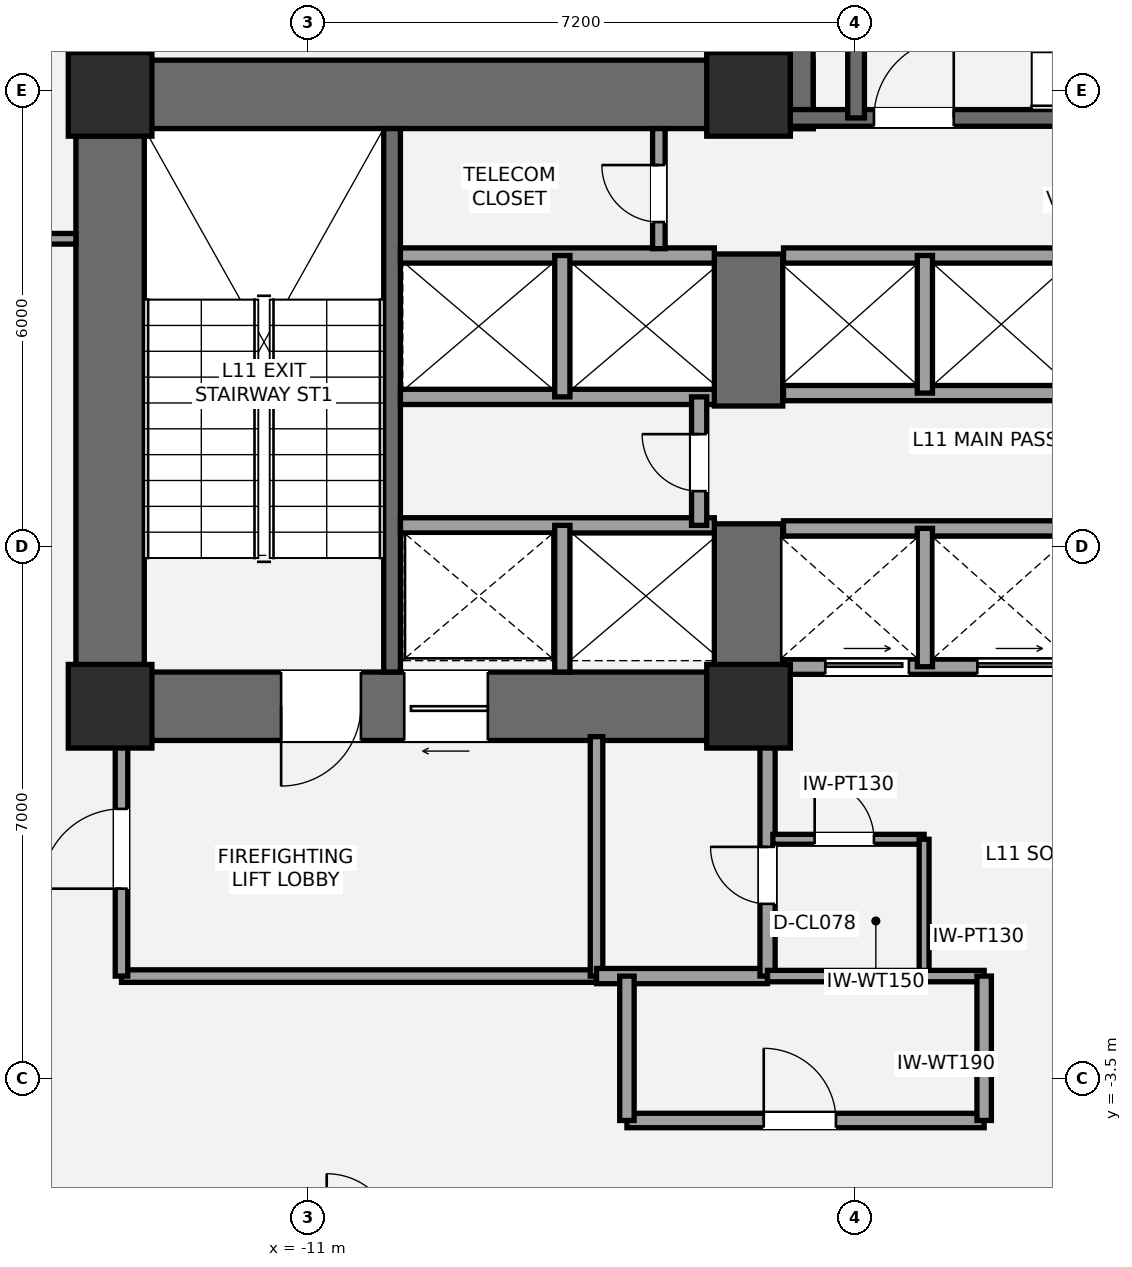
"""IFC4 building model, lengths in metres.
Left out: names, types, materials, properties, quantities, classifications, styles, units other than length and angle.
Written with IfcOpenShell. Run it as: python <this file> out.ifc"""

import sys

from ifc_helpers import new_model, si_unit, direction, frame, frame_2d, origin, origin_2d, place, context, subcontext, project, spatial, rectangle, extrude, element, fill, save


model = new_model("IFC4")
c1 = context("Model", 3, precision=1e-05, world=origin(), true_north=direction((0.0, 1.0)))
c2 = subcontext(c1, "Body", "Model", "MODEL_VIEW")
j1 = project(units=[si_unit("LENGTHUNIT", "METRE"), si_unit("PLANEANGLEUNIT", "RADIAN")], contexts=[c1])
p1 = place(None, origin())
s1 = spatial("IfcSite", under=j1, at=p1, CompositionType="ELEMENT")
p2 = place(p1, origin())
s2 = spatial("IfcBuilding", under=s1, at=p2, CompositionType="ELEMENT")
p3 = place(p2, frame((0.0, 0.0, 45.0)))
s3 = spatial("IfcBuildingStorey", under=s2, at=p3, CompositionType="ELEMENT", Elevation=45.0)
p4 = place(p3, frame((-13.6, 0.95, 0.0), z_axis=(0.0, 0.0, 1.0), x_axis=(0.0, 1.0, 0.0)))
e1 = element("IfcWall", 1, at=p4, inside=s3, PredefinedType="SHEAR", context=c2, shape_type="SweptSolid", body=[
    extrude(rectangle(XDim=8.95, YDim=0.9, at=frame_2d((4.475, 0.0))), origin(), (0.0, 0.0, 1.0), 3.6),
])
p5 = place(p3, frame((-14.05, 9.45, 0.0), z_axis=(0.0, 0.0, 1.0), x_axis=(1.0, 0.0, 0.0)))
e2 = element("IfcWall", 2, at=p5, inside=s3, PredefinedType="SHEAR", context=c2, shape_type="SweptSolid", body=[
    extrude(rectangle(XDim=9.7, YDim=0.9, at=frame_2d((4.85, 0.0))), origin(), (0.0, 0.0, 1.0), 3.6),
])
p6 = place(p3, frame((-4.75, 1.4, 0.0), z_axis=(0.0, 0.0, 1.0), x_axis=(-1.0, 0.0, 0.0)))
e3 = element("IfcWall", 3, at=p6, inside=s3, PredefinedType="SHEAR", context=c2, shape_type="SweptSolid", body=[
    extrude(rectangle(XDim=9.3, YDim=0.9, at=frame_2d((4.65, 0.0))), origin(), (0.0, 0.0, 1.0), 3.6),
])
p7 = place(p6, frame((5.55, 0.0, 0.0)))
e4 = element("IfcOpeningElement", 4, at=p7, cuts=e3, PredefinedType="OPENING", context=c2, shape_type="SweptSolid", body=[
    extrude(rectangle(XDim=1.05, YDim=2.15, at=frame_2d((0.525, 1.075))), frame((0.0, 0.46, 0.0), z_axis=(0.0, -1.0, 0.0), x_axis=(1.0, 0.0, 0.0)), (0.0, 0.0, 1.0), 0.92),
])
p8 = place(p6, frame((3.88, 0.0, 0.0)))
e5 = element("IfcOpeningElement", 5, at=p8, cuts=e3, PredefinedType="OPENING", context=c2, shape_type="SweptSolid", body=[
    extrude(rectangle(XDim=1.1, YDim=2.2, at=frame_2d((0.55, 1.1))), frame((0.0, 0.46, 0.0), z_axis=(0.0, -1.0, 0.0), x_axis=(1.0, 0.0, 0.0)), (0.0, 0.0, 1.0), 0.92),
])
p9 = place(p3, frame((-5.2, 0.95, 0.0), z_axis=(0.0, 0.0, 1.0), x_axis=(0.0, 1.0, 0.0)))
e6 = element("IfcWall", 6, at=p9, inside=s3, PredefinedType="SHEAR", context=c2, shape_type="SweptSolid", body=[
    extrude(rectangle(XDim=2.85, YDim=0.9, at=frame_2d((1.425, 0.0))), origin(), (0.0, 0.0, 1.0), 3.6),
])
p10 = place(p3, frame((-5.2, 5.35, 0.0), z_axis=(0.0, 0.0, 1.0), x_axis=(0.0, 1.0, 0.0)))
e7 = element("IfcWall", 7, at=p10, inside=s3, PredefinedType="SHEAR", context=c2, shape_type="SweptSolid", body=[
    extrude(rectangle(XDim=2.0, YDim=0.9, at=frame_2d((1.0, 0.0))), origin(), (0.0, 0.0, 1.0), 3.6),
])
p11 = place(p3, frame((-9.89, 1.85, 0.0), z_axis=(0.0, 0.0, 1.0), x_axis=(0.0, 1.0, 0.0)))
e8 = element("IfcWall", 8, at=p11, inside=s3, PredefinedType="SHEAR", context=c2, shape_type="SweptSolid", body=[
    extrude(rectangle(XDim=7.15, YDim=0.22, at=frame_2d((3.575, 0.0))), origin(), (0.0, 0.0, 1.0), 3.6),
])
p12 = place(p3, frame((-4.8, 9.0, 0.0), z_axis=(0.0, 0.0, 1.0), x_axis=(0.0, 1.0, 0.0)))
e9 = element("IfcWall", 9, at=p12, inside=s3, PredefinedType="SHEAR", context=c2, shape_type="SweptSolid", body=[
    extrude(rectangle(XDim=4.3, YDim=0.9, at=frame_2d((2.15, 0.0))), origin(), (0.0, 0.0, 1.0), 3.6),
])
p13 = place(p3, frame((-4.7, 9.14, 0.0), z_axis=(0.0, 0.0, 1.0), x_axis=(1.0, 0.0, 0.0)))
e10 = element("IfcWall", 10, at=p13, inside=s3, PredefinedType="SHEAR", context=c2, shape_type="SweptSolid", body=[
    extrude(rectangle(XDim=9.3, YDim=0.22, at=frame_2d((4.65, 0.0))), origin(), (0.0, 0.0, 1.0), 3.6),
])
p14 = place(p13, frame((1.15, 0.0, 0.0)))
e11 = element("IfcOpeningElement", 11, at=p14, cuts=e10, PredefinedType="OPENING", context=c2, shape_type="SweptSolid", body=[
    extrude(rectangle(XDim=1.05, YDim=2.15, at=frame_2d((0.525, 1.075))), frame((0.0, 0.12, 0.0), z_axis=(0.0, -1.0, 0.0), x_axis=(1.0, 0.0, 0.0)), (0.0, 0.0, 1.0), 0.24),
])
p15 = place(p3, frame((-3.785, 9.14, 0.0), z_axis=(0.0, 0.0, 1.0), x_axis=(0.0, 1.0, 0.0)))
e12 = element("IfcWall", 12, at=p15, inside=s3, PredefinedType="SHEAR", context=c2, shape_type="SweptSolid", body=[
    extrude(rectangle(XDim=3.26, YDim=0.22, at=frame_2d((1.63, 0.0))), origin(), (0.0, 0.0, 1.0), 3.6),
])
for number, where, z_axis, x_axis in (
    (13, (-13.6, 1.4, 0.0), (0.0, 0.0, 1.0), (1.0, 0.0, 0.0)),
    (14, (-13.6, 9.45, 0.0), (0.0, 0.0, 1.0), (1.0, 0.0, 0.0)),
    (15, (-5.2, 1.4, 0.0), (0.0, 0.0, 1.0), (1.0, 0.0, 0.0)),
    (16, (-5.2, 9.45, 0.0), (0.0, 0.0, 1.0), (1.0, 0.0, 0.0)),
):
    element("IfcColumn", number, at=place(p3, frame(where, z_axis=z_axis, x_axis=x_axis)), inside=s3, PredefinedType="COLUMN", context=c2, shape_type="SweptSolid", body=[
        extrude(rectangle(XDim=1.1, YDim=1.1, at=origin_2d()), origin(), (0.0, 0.0, 1.0), 3.6),
    ])
p16 = place(p3, frame((-13.45, -2.15, 0.0), z_axis=(0.0, 0.0, 1.0), x_axis=(1.0, 0.0, 0.0)))
e17 = element("IfcWall", 17, at=p16, inside=s3, PredefinedType="PARTITIONING", context=c2, shape_type="SweptSolid", body=[
    extrude(rectangle(XDim=6.25, YDim=0.165, at=frame_2d((3.125, 0.0))), origin(), (0.0, 0.0, 1.0), 2.853),
])
p17 = place(p3, frame((-13.45, -2.15, 0.0), z_axis=(0.0, 0.0, 1.0), x_axis=(0.0, 1.0, 0.0)))
e18 = element("IfcWall", 18, at=p17, inside=s3, PredefinedType="PARTITIONING", context=c2, shape_type="SweptSolid", body=[
    extrude(rectangle(XDim=3.15, YDim=0.165, at=frame_2d((1.575, 0.0))), origin(), (0.0, 0.0, 1.0), 2.853),
])
p18 = place(p17, frame((1.15, 0.0, 0.0)))
e19 = element("IfcOpeningElement", 19, at=p18, cuts=e18, PredefinedType="OPENING", context=c2, shape_type="SweptSolid", body=[
    extrude(rectangle(XDim=1.05, YDim=2.15, at=frame_2d((0.525, 1.075))), frame((0.0, 0.093, 0.0), z_axis=(0.0, -1.0, 0.0), x_axis=(1.0, 0.0, 0.0)), (0.0, 0.0, 1.0), 0.185),
])
p19 = place(p3, frame((-7.2, -2.15, 0.0), z_axis=(0.0, 0.0, 1.0), x_axis=(0.0, 1.0, 0.0)))
e20 = element("IfcWall", 20, at=p19, inside=s3, PredefinedType="PARTITIONING", context=c2, shape_type="SweptSolid", body=[
    extrude(rectangle(XDim=3.15, YDim=0.165, at=frame_2d((1.575, 0.0))), origin(), (0.0, 0.0, 1.0), 2.853),
])
p20 = place(p3, frame((-7.2, -2.15, 0.0), z_axis=(0.0, 0.0, 1.0), x_axis=(1.0, 0.0, 0.0)))
e21 = element("IfcWall", 21, at=p20, inside=s3, PredefinedType="SOLIDWALL", context=c2, shape_type="SweptSolid", body=[
    extrude(rectangle(XDim=2.25, YDim=0.2, at=frame_2d((1.125, 0.0))), origin(), (0.0, 0.0, 1.0), 3.4),
])
p21 = place(p3, frame((-4.95, -2.15, 0.0), z_axis=(0.0, 0.0, 1.0), x_axis=(0.0, 1.0, 0.0)))
e22 = element("IfcWall", 22, at=p21, inside=s3, PredefinedType="SOLIDWALL", context=c2, shape_type="SweptSolid", body=[
    extrude(rectangle(XDim=3.15, YDim=0.2, at=frame_2d((1.575, 0.0))), origin(), (0.0, 0.0, 1.0), 2.853),
])
p22 = place(p21, frame((0.95, 0.0, 0.0)))
e23 = element("IfcOpeningElement", 23, at=p22, cuts=e22, PredefinedType="OPENING", context=c2, shape_type="SweptSolid", body=[
    extrude(rectangle(XDim=0.75, YDim=2.1, at=frame_2d((0.375, 1.05))), frame((0.0, 0.11, 0.0), z_axis=(0.0, -1.0, 0.0), x_axis=(1.0, 0.0, 0.0)), (0.0, 0.0, 1.0), 0.22),
])
p23 = place(p3, frame((-4.88, -0.35, 0.0), z_axis=(0.0, 0.0, 1.0), x_axis=(1.0, 0.0, 0.0)))
e24 = element("IfcWall", 24, at=p23, inside=s3, PredefinedType="PARTITIONING", context=c2, shape_type="SweptSolid", body=[
    extrude(rectangle(XDim=1.99, YDim=0.13, at=frame_2d((0.995, 0.0))), origin(), (0.0, 0.0, 1.0), 3.4),
])
p24 = place(p23, frame((0.55, 0.0, 0.0)))
e25 = element("IfcOpeningElement", 25, at=p24, cuts=e24, PredefinedType="OPENING", context=c2, shape_type="SweptSolid", body=[
    extrude(rectangle(XDim=0.78, YDim=2.1, at=frame_2d((0.39, 1.05))), frame((0.0, 0.075, 0.0), z_axis=(0.0, -1.0, 0.0), x_axis=(1.0, 0.0, 0.0)), (0.0, 0.0, 1.0), 0.15),
])
p25 = place(p3, frame((-2.89, -2.15, 0.0), z_axis=(0.0, 0.0, 1.0), x_axis=(0.0, 1.0, 0.0)))
e26 = element("IfcWall", 26, at=p25, inside=s3, PredefinedType="PARTITIONING", context=c2, shape_type="SweptSolid", body=[
    extrude(rectangle(XDim=1.8, YDim=0.13, at=frame_2d((0.9, 0.0))), origin(), (0.0, 0.0, 1.0), 3.4),
])
p26 = place(p3, frame((-9.78, 3.78, 0.0), z_axis=(0.0, 0.0, 1.0), x_axis=(1.0, 0.0, 0.0)))
e27 = element("IfcWall", 27, at=p26, inside=s3, PredefinedType="SOLIDWALL", context=c2, shape_type="SweptSolid", body=[
    extrude(rectangle(XDim=4.13, YDim=0.2, at=frame_2d((2.065, 0.0))), origin(), (0.0, 0.0, 1.0), 3.4),
])
p27 = place(p3, frame((-7.65, 1.85, 0.0), z_axis=(0.0, 0.0, 1.0), x_axis=(0.0, 1.0, 0.0)))
e28 = element("IfcWall", 28, at=p27, inside=s3, PredefinedType="SOLIDWALL", context=c2, shape_type="SweptSolid", body=[
    extrude(rectangle(XDim=1.93, YDim=0.2, at=frame_2d((0.965, 0.0))), origin(), (0.0, 0.0, 1.0), 3.4),
])
for number, where, z_axis, x_axis in (
    (29, (-9.78, 5.47, 0.0), (0.0, 0.0, 1.0), (1.0, 0.0, 0.0)),
    (30, (-9.78, 7.33, 0.0), (0.0, 0.0, 1.0), (1.0, 0.0, 0.0)),
):
    element("IfcWall", number, at=place(p3, frame(where, z_axis=z_axis, x_axis=x_axis)), inside=s3, PredefinedType="SOLIDWALL", context=c2, shape_type="SweptSolid", body=[
        extrude(rectangle(XDim=4.13, YDim=0.2, at=frame_2d((2.065, 0.0))), origin(), (0.0, 0.0, 1.0), 3.4),
    ])
p28 = place(p3, frame((-7.65, 5.47, 0.0), z_axis=(0.0, 0.0, 1.0), x_axis=(0.0, 1.0, 0.0)))
e31 = element("IfcWall", 31, at=p28, inside=s3, PredefinedType="SOLIDWALL", context=c2, shape_type="SweptSolid", body=[
    extrude(rectangle(XDim=1.86, YDim=0.2, at=frame_2d((0.93, 0.0))), origin(), (0.0, 0.0, 1.0), 3.4),
])
p29 = place(p3, frame((-5.85, 3.78, 0.0), z_axis=(0.0, 0.0, 1.0), x_axis=(0.0, 1.0, 0.0)))
e32 = element("IfcWall", 32, at=p29, inside=s3, PredefinedType="SOLIDWALL", context=c2, shape_type="SweptSolid", body=[
    extrude(rectangle(XDim=1.69, YDim=0.2, at=frame_2d((0.845, 0.0))), origin(), (0.0, 0.0, 1.0), 3.4),
])
p30 = place(p29, frame((0.45, 0.0, 0.0)))
e33 = element("IfcOpeningElement", 33, at=p30, cuts=e32, PredefinedType="OPENING", context=c2, shape_type="SweptSolid", body=[
    extrude(rectangle(XDim=0.75, YDim=2.1, at=frame_2d((0.375, 1.05))), frame((0.0, 0.11, 0.0), z_axis=(0.0, -1.0, 0.0), x_axis=(1.0, 0.0, 0.0)), (0.0, 0.0, 1.0), 0.22),
])
p31 = place(p3, frame((-4.74, 1.92, 0.0), z_axis=(0.0, 0.0, 1.0), x_axis=(1.0, 0.0, 0.0)))
e34 = element("IfcWall", 34, at=p31, inside=s3, PredefinedType="SOLIDWALL", context=c2, shape_type="SweptSolid", body=[
    extrude(rectangle(XDim=3.86, YDim=0.2, at=frame_2d((1.93, 0.0))), origin(), (0.0, 0.0, 1.0), 2.39),
])
p32 = place(p31, frame((0.55, 0.0, 0.0)))
e35 = element("IfcOpeningElement", 35, at=p32, cuts=e34, PredefinedType="OPENING", context=c2, shape_type="SweptSolid", body=[
    extrude(rectangle(XDim=1.1, YDim=2.2, at=frame_2d((0.55, 1.1))), frame((0.0, 0.11, 0.0), z_axis=(0.0, -1.0, 0.0), x_axis=(1.0, 0.0, 0.0)), (0.0, 0.0, 1.0), 0.22),
])
p33 = place(p31, frame((2.55, 0.0, 0.0)))
e36 = element("IfcOpeningElement", 36, at=p33, cuts=e34, PredefinedType="OPENING", context=c2, shape_type="SweptSolid", body=[
    extrude(rectangle(XDim=1.1, YDim=2.2, at=frame_2d((0.55, 1.1))), frame((0.0, 0.11, 0.0), z_axis=(0.0, -1.0, 0.0), x_axis=(1.0, 0.0, 0.0)), (0.0, 0.0, 1.0), 0.22),
])
p34 = place(p3, frame((-4.74, 3.74, 0.0), z_axis=(0.0, 0.0, 1.0), x_axis=(1.0, 0.0, 0.0)))
e37 = element("IfcWall", 37, at=p34, inside=s3, PredefinedType="SOLIDWALL", context=c2, shape_type="SweptSolid", body=[
    extrude(rectangle(XDim=3.86, YDim=0.2, at=frame_2d((1.93, 0.0))), origin(), (0.0, 0.0, 1.0), 3.4),
])
p35 = place(p3, frame((-2.88, 1.92, 0.0), z_axis=(0.0, 0.0, 1.0), x_axis=(0.0, 1.0, 0.0)))
e38 = element("IfcWall", 38, at=p35, inside=s3, PredefinedType="SOLIDWALL", context=c2, shape_type="SweptSolid", body=[
    extrude(rectangle(XDim=1.82, YDim=0.2, at=frame_2d((0.91, 0.0))), origin(), (0.0, 0.0, 1.0), 3.4),
])
for number, where, z_axis, x_axis in (
    (39, (-4.74, 5.52, 0.0), (0.0, 0.0, 1.0), (1.0, 0.0, 0.0)),
    (40, (-4.74, 7.33, 0.0), (0.0, 0.0, 1.0), (1.0, 0.0, 0.0)),
):
    element("IfcWall", number, at=place(p3, frame(where, z_axis=z_axis, x_axis=x_axis)), inside=s3, PredefinedType="SOLIDWALL", context=c2, shape_type="SweptSolid", body=[
        extrude(rectangle(XDim=3.86, YDim=0.2, at=frame_2d((1.93, 0.0))), origin(), (0.0, 0.0, 1.0), 3.4),
    ])
p36 = place(p3, frame((-2.88, 5.52, 0.0), z_axis=(0.0, 0.0, 1.0), x_axis=(0.0, 1.0, 0.0)))
e41 = element("IfcWall", 41, at=p36, inside=s3, PredefinedType="SOLIDWALL", context=c2, shape_type="SweptSolid", body=[
    extrude(rectangle(XDim=1.81, YDim=0.2, at=frame_2d((0.905, 0.0))), origin(), (0.0, 0.0, 1.0), 3.4),
])
p37 = place(p3, frame((-6.38, 7.42, 0.0), z_axis=(0.0, 0.0, 1.0), x_axis=(0.0, 1.0, 0.0)))
e42 = element("IfcWall", 42, at=p37, inside=s3, PredefinedType="PARTITIONING", context=c2, shape_type="SweptSolid", body=[
    extrude(rectangle(XDim=1.58, YDim=0.165, at=frame_2d((0.79, 0.0))), origin(), (0.0, 0.0, 1.0), 3.4),
])
p38 = place(p37, frame((0.35, 0.0, 0.0)))
e43 = element("IfcOpeningElement", 43, at=p38, cuts=e42, PredefinedType="OPENING", context=c2, shape_type="SweptSolid", body=[
    extrude(rectangle(XDim=0.75, YDim=2.1, at=frame_2d((0.375, 1.05))), frame((0.0, 0.093, 0.0), z_axis=(0.0, -1.0, 0.0), x_axis=(1.0, 0.0, 0.0)), (0.0, 0.0, 1.0), 0.185),
])
p39 = place(p3, frame((-6.8, -4.05, 0.0), z_axis=(0.0, 0.0, 1.0), x_axis=(1.0, 0.0, 0.0)))
e44 = element("IfcWall", 44, at=p39, inside=s3, PredefinedType="PLUMBINGWALL", context=c2, shape_type="SweptSolid", body=[
    extrude(rectangle(XDim=4.7, YDim=0.19, at=frame_2d((2.35, 0.0))), origin(), (0.0, 0.0, 1.0), 2.853),
])
p40 = place(p39, frame((1.8, 0.0, 0.0)))
e45 = element("IfcOpeningElement", 45, at=p40, cuts=e44, PredefinedType="OPENING", context=c2, shape_type="SweptSolid", body=[
    extrude(rectangle(XDim=0.95, YDim=2.15, at=frame_2d((0.475, 1.075))), frame((0.0, 0.105, 0.0), z_axis=(0.0, -1.0, 0.0), x_axis=(1.0, 0.0, 0.0)), (0.0, 0.0, 1.0), 0.21),
])
p41 = place(p3, frame((-4.95, -2.15, 0.0), z_axis=(0.0, 0.0, 1.0), x_axis=(1.0, 0.0, 0.0)))
e46 = element("IfcWall", 46, at=p41, inside=s3, PredefinedType="PLUMBINGWALL", context=c2, shape_type="SweptSolid", body=[
    extrude(rectangle(XDim=2.85, YDim=0.15, at=frame_2d((1.425, 0.0))), origin(), (0.0, 0.0, 1.0), 2.853),
])
for number, where, z_axis, x_axis in (
    (47, (-6.8, -4.05, 0.0), (0.0, 0.0, 1.0), (0.0, 1.0, 0.0)),
    (48, (-2.1, -4.05, 0.0), (0.0, 0.0, 1.0), (0.0, 1.0, 0.0)),
):
    element("IfcWall", number, at=place(p3, frame(where, z_axis=z_axis, x_axis=x_axis)), inside=s3, PredefinedType="PLUMBINGWALL", context=c2, shape_type="SweptSolid", body=[
        extrude(rectangle(XDim=1.9, YDim=0.19, at=frame_2d((0.95, 0.0))), origin(), (0.0, 0.0, 1.0), 3.4),
    ])
p42 = place(p3, frame((-24.856, 7.55, 0.0), z_axis=(0.0, 0.0, 1.0), x_axis=(1.0, 0.0, 0.0)))
e49 = element("IfcWall", 49, at=p42, inside=s3, PredefinedType="PARTITIONING", context=c2, shape_type="SweptSolid", body=[
    extrude(rectangle(XDim=10.806, YDim=0.14, at=frame_2d((5.403, 0.0))), origin(), (0.0, 0.0, 1.0), 2.853),
])
p43 = place(p42, frame((1.939, 0.0, 0.0)))
e50 = element("IfcOpeningElement", 50, at=p43, cuts=e49, PredefinedType="OPENING", context=c2, shape_type="SweptSolid", body=[
    extrude(rectangle(XDim=0.92, YDim=2.15, at=frame_2d((0.46, 1.075))), frame((0.0, 0.08, 0.0), z_axis=(0.0, -1.0, 0.0), x_axis=(1.0, 0.0, 0.0)), (0.0, 0.0, 1.0), 0.16),
])
p44 = place(p7, origin())
e51 = element("IfcDoor", 51, at=p44, inside=s3, OperationType="SINGLE_SWING_RIGHT", PredefinedType="DOOR", context=c2, shape_type="SweptSolid", body=[
    extrude(rectangle(XDim=1.05, YDim=2.15, at=frame_2d((0.525, 1.075))), frame((0.0, 0.025, 0.0), z_axis=(0.0, -1.0, 0.0), x_axis=(1.0, 0.0, 0.0)), (0.0, 0.0, 1.0), 0.05),
])
fill(e4, e51)
p45 = place(p14, origin())
e52 = element("IfcDoor", 52, at=p45, inside=s3, OperationType="SINGLE_SWING_RIGHT", PredefinedType="DOOR", context=c2, shape_type="SweptSolid", body=[
    extrude(rectangle(XDim=1.05, YDim=2.15, at=frame_2d((0.525, 1.075))), frame((0.0, 0.025, 0.0), z_axis=(0.0, -1.0, 0.0), x_axis=(1.0, 0.0, 0.0)), (0.0, 0.0, 1.0), 0.05),
])
fill(e11, e52)
p46 = place(p18, origin())
e53 = element("IfcDoor", 53, at=p46, inside=s3, OperationType="SINGLE_SWING_LEFT", PredefinedType="DOOR", context=c2, shape_type="SweptSolid", body=[
    extrude(rectangle(XDim=1.05, YDim=2.15, at=frame_2d((0.525, 1.075))), frame((0.0, 0.025, 0.0), z_axis=(0.0, -1.0, 0.0), x_axis=(1.0, 0.0, 0.0)), (0.0, 0.0, 1.0), 0.05),
])
fill(e19, e53)
p47 = place(p22, origin())
e54 = element("IfcDoor", 54, at=p47, inside=s3, OperationType="SINGLE_SWING_RIGHT", PredefinedType="DOOR", context=c2, shape_type="SweptSolid", body=[
    extrude(rectangle(XDim=0.75, YDim=2.1, at=frame_2d((0.375, 1.05))), frame((0.0, 0.025, 0.0), z_axis=(0.0, -1.0, 0.0), x_axis=(1.0, 0.0, 0.0)), (0.0, 0.0, 1.0), 0.05),
])
fill(e23, e54)
p48 = place(p24, origin())
e55 = element("IfcDoor", 55, at=p48, inside=s3, OperationType="SINGLE_SWING_LEFT", PredefinedType="DOOR", context=c2, shape_type="SweptSolid", body=[
    extrude(rectangle(XDim=0.78, YDim=2.1, at=frame_2d((0.39, 1.05))), frame((0.0, 0.025, 0.0), z_axis=(0.0, -1.0, 0.0), x_axis=(1.0, 0.0, 0.0)), (0.0, 0.0, 1.0), 0.05),
])
fill(e25, e55)
p49 = place(p8, origin())
e56 = element("IfcDoor", 56, at=p49, inside=s3, OperationType="SLIDING_TO_LEFT", PredefinedType="DOOR", context=c2, shape_type="SweptSolid", body=[
    extrude(rectangle(XDim=1.1, YDim=2.2, at=frame_2d((0.55, 1.1))), frame((0.0, 0.025, 0.0), z_axis=(0.0, -1.0, 0.0), x_axis=(1.0, 0.0, 0.0)), (0.0, 0.0, 1.0), 0.05),
])
fill(e5, e56)
p50 = place(p30, origin())
e57 = element("IfcDoor", 57, at=p50, inside=s3, OperationType="SINGLE_SWING_RIGHT", PredefinedType="DOOR", context=c2, shape_type="SweptSolid", body=[
    extrude(rectangle(XDim=0.75, YDim=2.1, at=frame_2d((0.375, 1.05))), frame((0.0, 0.025, 0.0), z_axis=(0.0, -1.0, 0.0), x_axis=(1.0, 0.0, 0.0)), (0.0, 0.0, 1.0), 0.05),
])
fill(e33, e57)
p51 = place(p32, origin())
e58 = element("IfcDoor", 58, at=p51, inside=s3, OperationType="SLIDING_TO_LEFT", PredefinedType="DOOR", context=c2, shape_type="SweptSolid", body=[
    extrude(rectangle(XDim=1.1, YDim=2.2, at=frame_2d((0.55, 1.1))), frame((0.0, 0.025, 0.0), z_axis=(0.0, -1.0, 0.0), x_axis=(1.0, 0.0, 0.0)), (0.0, 0.0, 1.0), 0.05),
])
fill(e35, e58)
p52 = place(p33, origin())
e59 = element("IfcDoor", 59, at=p52, inside=s3, OperationType="SLIDING_TO_LEFT", PredefinedType="DOOR", context=c2, shape_type="SweptSolid", body=[
    extrude(rectangle(XDim=1.1, YDim=2.2, at=frame_2d((0.55, 1.1))), frame((0.0, 0.025, 0.0), z_axis=(0.0, -1.0, 0.0), x_axis=(1.0, 0.0, 0.0)), (0.0, 0.0, 1.0), 0.05),
])
fill(e36, e59)
p53 = place(p38, origin())
e60 = element("IfcDoor", 60, at=p53, inside=s3, OperationType="SINGLE_SWING_RIGHT", PredefinedType="DOOR", context=c2, shape_type="SweptSolid", body=[
    extrude(rectangle(XDim=0.75, YDim=2.1, at=frame_2d((0.375, 1.05))), frame((0.0, 0.025, 0.0), z_axis=(0.0, -1.0, 0.0), x_axis=(1.0, 0.0, 0.0)), (0.0, 0.0, 1.0), 0.05),
])
fill(e43, e60)
p54 = place(p40, origin())
e61 = element("IfcDoor", 61, at=p54, inside=s3, OperationType="SINGLE_SWING_LEFT", PredefinedType="DOOR", context=c2, shape_type="SweptSolid", body=[
    extrude(rectangle(XDim=0.95, YDim=2.15, at=frame_2d((0.475, 1.075))), frame((0.0, 0.025, 0.0), z_axis=(0.0, -1.0, 0.0), x_axis=(1.0, 0.0, 0.0)), (0.0, 0.0, 1.0), 0.05),
])
fill(e45, e61)
save(model, sys.argv[1])
